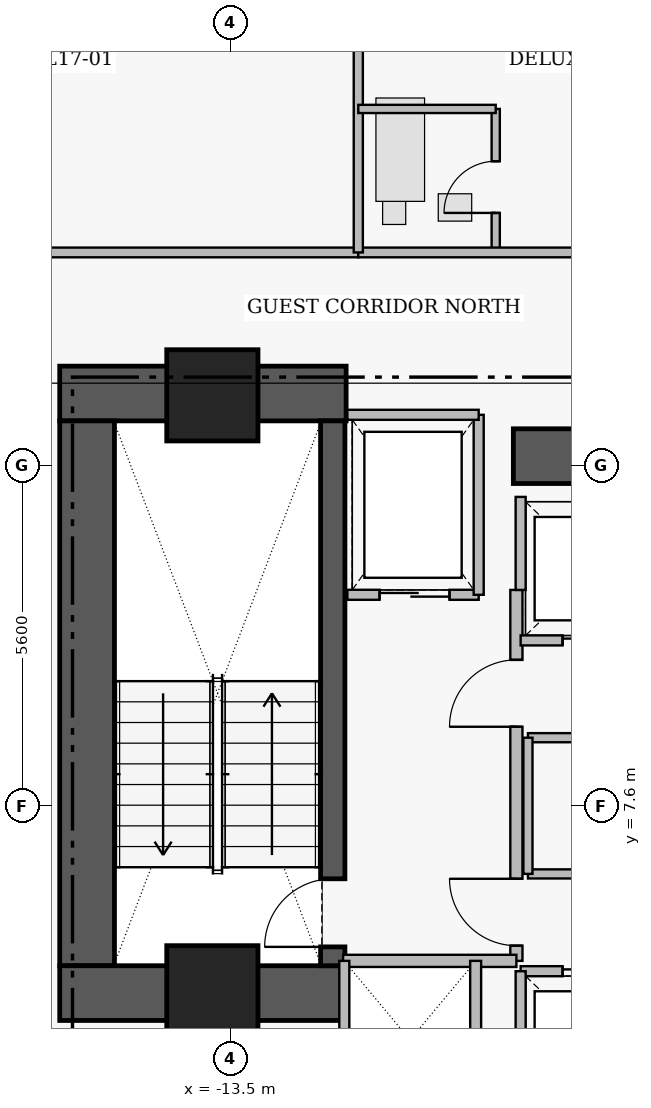
"""IFC4 building model, lengths in metres.
Left out: names, types, materials, properties, quantities, classifications, styles, units other than length and angle.
Written with IfcOpenShell. Run it as: python <this file> out.ifc"""

import sys

from ifc_helpers import new_model, si_unit, direction, frame, frame_2d, origin, origin_2d, place, context, subcontext, project, spatial, rectangle, extrude, element, fill, save


model = new_model("IFC4")
c1 = context("Model", 3, precision=1e-05, world=origin(), true_north=direction((0.0, 1.0)))
c2 = subcontext(c1, "Body", "Model", "MODEL_VIEW")
j1 = project(units=[si_unit("LENGTHUNIT", "METRE"), si_unit("PLANEANGLEUNIT", "RADIAN")], contexts=[c1])
p1 = place(None, origin())
s1 = spatial("IfcSite", under=j1, at=p1, CompositionType="ELEMENT")
p2 = place(p1, origin())
s2 = spatial("IfcBuilding", under=s1, at=p2, CompositionType="ELEMENT")
p3 = place(p2, frame((0.0, 0.0, 71.4)))
s3 = spatial("IfcBuildingStorey", under=s2, at=p3, CompositionType="ELEMENT", Elevation=71.4)
p4 = place(p3, frame((-16.31, 14.38, 0.0), z_axis=(0.0, 0.0, 1.0), x_axis=(1.0, 0.0, 0.0)))
e1 = element("IfcWall", 1, at=p4, inside=s3, PredefinedType="SHEAR", context=c2, shape_type="SweptSolid", body=[
    extrude(rectangle(XDim=4.71, YDim=0.9, at=frame_2d((2.355, 0.0))), origin(), (0.0, 0.0, 1.0), 3.46),
])
p5 = place(p3, frame((-15.86, 4.97, 0.0), z_axis=(0.0, 0.0, 1.0), x_axis=(0.0, 1.0, 0.0)))
e2 = element("IfcWall", 2, at=p5, inside=s3, PredefinedType="SHEAR", context=c2, shape_type="SweptSolid", body=[
    extrude(rectangle(XDim=8.96, YDim=0.9, at=frame_2d((4.48, 0.0))), origin(), (0.0, 0.0, 1.0), 3.46),
])
p6 = place(p3, frame((-16.31, 4.52, 0.0), z_axis=(0.0, 0.0, 1.0), x_axis=(1.0, 0.0, 0.0)))
e3 = element("IfcWall", 3, at=p6, inside=s3, PredefinedType="SHEAR", context=c2, shape_type="SweptSolid", body=[
    extrude(rectangle(XDim=4.71, YDim=0.9, at=frame_2d((2.355, 0.0))), origin(), (0.0, 0.0, 1.0), 3.46),
])
p7 = place(p3, frame((-8.85, 13.35, 0.0), z_axis=(0.0, 0.0, 1.0), x_axis=(1.0, 0.0, 0.0)))
e4 = element("IfcWall", 4, at=p7, inside=s3, PredefinedType="SHEAR", context=c2, shape_type="SweptSolid", body=[
    extrude(rectangle(XDim=7.6, YDim=0.9, at=frame_2d((3.8, 0.0))), origin(), (0.0, 0.0, 1.0), 3.43),
])
p8 = place(p3, frame((-11.82, 4.97, 0.0), z_axis=(0.0, 0.0, 1.0), x_axis=(0.0, 1.0, 0.0)))
e5 = element("IfcWall", 5, at=p8, inside=s3, PredefinedType="SHEAR", context=c2, shape_type="SweptSolid", body=[
    extrude(rectangle(XDim=8.96, YDim=0.4, at=frame_2d((4.48, 0.0))), origin(), (0.0, 0.0, 1.0), 3.46),
])
p9 = place(p8, frame((0.31, 0.0, 0.0)))
e6 = element("IfcOpeningElement", 6, at=p9, cuts=e5, PredefinedType="OPENING", context=c2, shape_type="SweptSolid", body=[
    extrude(rectangle(XDim=1.12, YDim=2.22, at=frame_2d((0.56, 1.11))), frame((0.0, 0.21, 0.0), z_axis=(0.0, -1.0, 0.0), x_axis=(1.0, 0.0, 0.0)), (0.0, 0.0, 1.0), 0.42),
])
for number, where, z_axis, x_axis in (
    (7, (-13.8, 14.35, 0.0), (0.0, 0.0, 1.0), (1.0, 0.0, 0.0)),
    (8, (-13.8, 4.55, 0.0), (0.0, 0.0, 1.0), (1.0, 0.0, 0.0)),
):
    element("IfcColumn", number, at=place(p3, frame(where, z_axis=z_axis, x_axis=x_axis)), inside=s3, PredefinedType="COLUMN", context=c2, shape_type="SweptSolid", body=[
        extrude(rectangle(XDim=1.5, YDim=1.5, at=origin_2d()), origin(), (0.0, 0.0, 1.0), 3.65),
    ])
p10 = place(p3, frame((-8.8, 5.05, 0.0), z_axis=(0.0, 0.0, 1.0), x_axis=(0.0, 1.0, 0.0)))
e9 = element("IfcWall", 9, at=p10, inside=s3, PredefinedType="PARTITIONING", context=c2, shape_type="SweptSolid", body=[
    extrude(rectangle(XDim=6.1, YDim=0.2, at=frame_2d((3.05, 0.0))), origin(), (0.0, 0.0, 1.0), 3.43),
])
p11 = place(p10, frame((0.25, 0.0, 0.0)))
e10 = element("IfcOpeningElement", 10, at=p11, cuts=e9, PredefinedType="OPENING", context=c2, shape_type="SweptSolid", body=[
    extrude(rectangle(XDim=1.1, YDim=2.2, at=frame_2d((0.55, 1.1))), frame((0.0, 0.11, 0.0), z_axis=(0.0, -1.0, 0.0), x_axis=(1.0, 0.0, 0.0)), (0.0, 0.0, 1.0), 0.22),
])
p12 = place(p10, frame((3.85, 0.0, 0.0)))
e11 = element("IfcOpeningElement", 11, at=p12, cuts=e9, PredefinedType="OPENING", context=c2, shape_type="SweptSolid", body=[
    extrude(rectangle(XDim=1.1, YDim=2.2, at=frame_2d((0.55, 1.1))), frame((0.0, 0.11, 0.0), z_axis=(0.0, -1.0, 0.0), x_axis=(1.0, 0.0, 0.0)), (0.0, 0.0, 1.0), 0.22),
])
p13 = place(p3, frame((-11.58, 11.07, 0.0), z_axis=(0.0, 0.0, 1.0), x_axis=(1.0, 0.0, 0.0)))
e12 = element("IfcWall", 12, at=p13, inside=s3, PredefinedType="PARTITIONING", context=c2, shape_type="SweptSolid", body=[
    extrude(rectangle(XDim=2.16, YDim=0.165, at=frame_2d((1.08, 0.0))), origin(), (0.0, 0.0, 1.0), 3.43),
])
p14 = place(p13, frame((0.53, 0.0, 0.0)))
e13 = element("IfcOpeningElement", 13, at=p14, cuts=e12, PredefinedType="OPENING", context=c2, shape_type="SweptSolid", body=[
    extrude(rectangle(XDim=1.15, YDim=2.25, at=frame_2d((0.575, 1.125))), frame((0.0, 0.093, 0.0), z_axis=(0.0, -1.0, 0.0), x_axis=(1.0, 0.0, 0.0)), (0.0, 0.0, 1.0), 0.185),
])
p15 = place(p3, frame((-8.73, 4.88, 0.0), z_axis=(0.0, 0.0, 1.0), x_axis=(1.0, 0.0, 0.0)))
e14 = element("IfcWall", 14, at=p15, inside=s3, PredefinedType="PARTITIONING", context=c2, shape_type="SweptSolid", body=[
    extrude(rectangle(XDim=2.48, YDim=0.165, at=frame_2d((1.24, 0.0))), origin(), (0.0, 0.0, 1.0), 3.43),
])
p16 = place(p15, frame((0.69, 0.0, 0.0)))
e15 = element("IfcOpeningElement", 15, at=p16, cuts=e14, PredefinedType="OPENING", context=c2, shape_type="SweptSolid", body=[
    extrude(rectangle(XDim=1.1, YDim=2.25, at=frame_2d((0.55, 1.125))), frame((0.0, 0.093, 0.0), z_axis=(0.0, -1.0, 0.0), x_axis=(1.0, 0.0, 0.0)), (0.0, 0.0, 1.0), 0.185),
])
p17 = place(p3, frame((-8.73, 10.32, 0.0), z_axis=(0.0, 0.0, 1.0), x_axis=(1.0, 0.0, 0.0)))
e16 = element("IfcWall", 16, at=p17, inside=s3, PredefinedType="PARTITIONING", context=c2, shape_type="SweptSolid", body=[
    extrude(rectangle(XDim=2.48, YDim=0.165, at=frame_2d((1.24, 0.0))), origin(), (0.0, 0.0, 1.0), 3.43),
])
p18 = place(p17, frame((0.69, 0.0, 0.0)))
e17 = element("IfcOpeningElement", 17, at=p18, cuts=e16, PredefinedType="OPENING", context=c2, shape_type="SweptSolid", body=[
    extrude(rectangle(XDim=1.1, YDim=2.25, at=frame_2d((0.55, 1.125))), frame((0.0, 0.093, 0.0), z_axis=(0.0, -1.0, 0.0), x_axis=(1.0, 0.0, 0.0)), (0.0, 0.0, 1.0), 0.185),
])
p19 = place(p3, frame((-8.61, 8.72, 0.0), z_axis=(0.0, 0.0, 1.0), x_axis=(1.0, 0.0, 0.0)))
e18 = element("IfcWall", 18, at=p19, inside=s3, PredefinedType="PARTITIONING", context=c2, shape_type="SweptSolid", body=[
    extrude(rectangle(XDim=2.92, YDim=0.15, at=frame_2d((1.46, 0.0))), origin(), (0.0, 0.0, 1.0), 3.43),
])
p20 = place(p19, frame((1.01, 0.0, 0.0)))
e19 = element("IfcOpeningElement", 19, at=p20, cuts=e18, PredefinedType="OPENING", context=c2, shape_type="SweptSolid", body=[
    extrude(rectangle(XDim=0.9, YDim=2.15, at=frame_2d((0.45, 1.075))), frame((0.0, 0.085, 0.0), z_axis=(0.0, -1.0, 0.0), x_axis=(1.0, 0.0, 0.0)), (0.0, 0.0, 1.0), 0.17),
])
p21 = place(p3, frame((-25.64, 16.7, 0.0), z_axis=(0.0, 0.0, 1.0), x_axis=(1.0, 0.0, 0.0)))
e20 = element("IfcWall", 20, at=p21, inside=s3, PredefinedType="PARTITIONING", context=c2, shape_type="SweptSolid", body=[
    extrude(rectangle(XDim=14.24, YDim=0.16, at=frame_2d((7.12, 0.0))), origin(), (0.0, 0.0, 1.0), 2.973),
])
p22 = place(p21, frame((7.77, 0.0, 0.0)))
e21 = element("IfcOpeningElement", 21, at=p22, cuts=e20, PredefinedType="OPENING", context=c2, shape_type="SweptSolid", body=[
    extrude(rectangle(XDim=1.0, YDim=2.15, at=frame_2d((0.5, 1.075))), frame((0.0, 0.09, 0.0), z_axis=(0.0, -1.0, 0.0), x_axis=(1.0, 0.0, 0.0)), (0.0, 0.0, 1.0), 0.18),
])
p23 = place(p3, frame((-9.14, 16.7, 0.0), z_axis=(0.0, 0.0, 1.0), x_axis=(0.0, 1.0, 0.0)))
e22 = element("IfcWall", 22, at=p23, inside=s3, PredefinedType="PLUMBINGWALL", context=c2, shape_type="SweptSolid", body=[
    extrude(rectangle(XDim=2.36, YDim=0.135, at=frame_2d((1.18, 0.0))), origin(), (0.0, 0.0, 1.0), 3.43),
])
p24 = place(p23, frame((0.65, 0.0, 0.0)))
e23 = element("IfcOpeningElement", 23, at=p24, cuts=e22, PredefinedType="OPENING", context=c2, shape_type="SweptSolid", body=[
    extrude(rectangle(XDim=0.85, YDim=2.1, at=frame_2d((0.425, 1.05))), frame((0.0, 0.077, 0.0), z_axis=(0.0, -1.0, 0.0), x_axis=(1.0, 0.0, 0.0)), (0.0, 0.0, 1.0), 0.155),
])
p25 = place(p3, frame((-11.4, 16.7, 0.0), z_axis=(0.0, 0.0, 1.0), x_axis=(1.0, 0.0, 0.0)))
e24 = element("IfcWall", 24, at=p25, inside=s3, PredefinedType="PARTITIONING", context=c2, shape_type="SweptSolid", body=[
    extrude(rectangle(XDim=11.32, YDim=0.16, at=frame_2d((5.66, 0.0))), origin(), (0.0, 0.0, 1.0), 2.973),
])
p26 = place(p25, frame((6.31, 0.0, 0.0)))
e25 = element("IfcOpeningElement", 25, at=p26, cuts=e24, PredefinedType="OPENING", context=c2, shape_type="SweptSolid", body=[
    extrude(rectangle(XDim=1.0, YDim=2.15, at=frame_2d((0.5, 1.075))), frame((0.0, 0.09, 0.0), z_axis=(0.0, -1.0, 0.0), x_axis=(1.0, 0.0, 0.0)), (0.0, 0.0, 1.0), 0.18),
])
p27 = place(p3, frame((-11.65, 5.05, 0.0), z_axis=(0.0, 0.0, 1.0), x_axis=(1.0, 0.0, 0.0)))
e26 = element("IfcWall", 26, at=p27, inside=s3, PredefinedType="PARTITIONING", context=c2, shape_type="SweptSolid", body=[
    extrude(rectangle(XDim=2.85, YDim=0.2, at=frame_2d((1.425, 0.0))), origin(), (0.0, 0.0, 1.0), 3.43),
])
p28 = place(p3, frame((-9.42, 11.07, 0.0), z_axis=(0.0, 0.0, 1.0), x_axis=(0.0, 1.0, 0.0)))
e27 = element("IfcWall", 27, at=p28, inside=s3, PredefinedType="PARTITIONING", context=c2, shape_type="SweptSolid", body=[
    extrude(rectangle(XDim=2.96, YDim=0.165, at=frame_2d((1.48, 0.0))), origin(), (0.0, 0.0, 1.0), 3.43),
])
p29 = place(p3, frame((-11.58, 14.03, 0.0), z_axis=(0.0, 0.0, 1.0), x_axis=(1.0, 0.0, 0.0)))
e28 = element("IfcWall", 28, at=p29, inside=s3, PredefinedType="PARTITIONING", context=c2, shape_type="SweptSolid", body=[
    extrude(rectangle(XDim=2.16, YDim=0.165, at=frame_2d((1.08, 0.0))), origin(), (0.0, 0.0, 1.0), 3.43),
])
p30 = place(p3, frame((-8.73, 2.52, 0.0), z_axis=(0.0, 0.0, 1.0), x_axis=(0.0, 1.0, 0.0)))
e29 = element("IfcWall", 29, at=p30, inside=s3, PredefinedType="PARTITIONING", context=c2, shape_type="SweptSolid", body=[
    extrude(rectangle(XDim=2.36, YDim=0.165, at=frame_2d((1.18, 0.0))), origin(), (0.0, 0.0, 1.0), 3.43),
])
p31 = place(p3, frame((-8.73, 11.15, 0.0), z_axis=(0.0, 0.0, 1.0), x_axis=(0.0, 1.0, 0.0)))
e30 = element("IfcWall", 30, at=p31, inside=s3, PredefinedType="PARTITIONING", context=c2, shape_type="SweptSolid", body=[
    extrude(rectangle(XDim=1.53, YDim=0.165, at=frame_2d((0.765, 0.0))), origin(), (0.0, 0.0, 1.0), 3.43),
])
p32 = place(p3, frame((-9.47, 2.45, 0.0), z_axis=(0.0, 0.0, 1.0), x_axis=(0.0, 1.0, 0.0)))
e31 = element("IfcWall", 31, at=p32, inside=s3, PredefinedType="PARTITIONING", context=c2, shape_type="SweptSolid", body=[
    extrude(rectangle(XDim=2.6, YDim=0.18, at=frame_2d((1.3, 0.0))), origin(), (0.0, 0.0, 1.0), 3.43),
])
p33 = place(p3, frame((-11.63, 2.47, 0.0), z_axis=(0.0, 0.0, 1.0), x_axis=(0.0, 1.0, 0.0)))
e32 = element("IfcWall", 32, at=p33, inside=s3, PredefinedType="PARTITIONING", context=c2, shape_type="SweptSolid", body=[
    extrude(rectangle(XDim=2.58, YDim=0.165, at=frame_2d((1.29, 0.0))), origin(), (0.0, 0.0, 1.0), 3.43),
])
p34 = place(p3, frame((-8.61, 6.48, 0.0), z_axis=(0.0, 0.0, 1.0), x_axis=(1.0, 0.0, 0.0)))
e33 = element("IfcWall", 33, at=p34, inside=s3, PredefinedType="PARTITIONING", context=c2, shape_type="SweptSolid", body=[
    extrude(rectangle(XDim=2.92, YDim=0.15, at=frame_2d((1.46, 0.0))), origin(), (0.0, 0.0, 1.0), 3.43),
])
p35 = place(p3, frame((-8.61, 6.48, 0.0), z_axis=(0.0, 0.0, 1.0), x_axis=(0.0, 1.0, 0.0)))
e34 = element("IfcWall", 34, at=p35, inside=s3, PredefinedType="PARTITIONING", context=c2, shape_type="SweptSolid", body=[
    extrude(rectangle(XDim=2.24, YDim=0.15, at=frame_2d((1.12, 0.0))), origin(), (0.0, 0.0, 1.0), 3.43),
])
p36 = place(p3, frame((-11.4, 16.7, 0.0), z_axis=(0.0, 0.0, 1.0), x_axis=(0.0, 1.0, 0.0)))
e35 = element("IfcWall", 35, at=p36, inside=s3, PredefinedType="PARTITIONING", context=c2, shape_type="SweptSolid", body=[
    extrude(rectangle(XDim=6.32, YDim=0.15, at=frame_2d((3.16, 0.0))), origin(), (0.0, 0.0, 1.0), 3.43),
])
p37 = place(p3, frame((-11.4, 19.06, 0.0), z_axis=(0.0, 0.0, 1.0), x_axis=(1.0, 0.0, 0.0)))
e36 = element("IfcWall", 36, at=p37, inside=s3, PredefinedType="PLUMBINGWALL", context=c2, shape_type="SweptSolid", body=[
    extrude(rectangle(XDim=2.26, YDim=0.135, at=frame_2d((1.13, 0.0))), origin(), (0.0, 0.0, 1.0), 2.973),
])
p38 = place(p9, origin())
e37 = element("IfcDoor", 37, at=p38, inside=s3, OperationType="SINGLE_SWING_LEFT", PredefinedType="DOOR", context=c2, shape_type="SweptSolid", body=[
    extrude(rectangle(XDim=1.12, YDim=2.22, at=frame_2d((0.56, 1.11))), frame((0.0, 0.025, 0.0), z_axis=(0.0, -1.0, 0.0), x_axis=(1.0, 0.0, 0.0)), (0.0, 0.0, 1.0), 0.05),
])
fill(e6, e37)
p39 = place(p11, origin())
e38 = element("IfcDoor", 38, at=p39, inside=s3, OperationType="SINGLE_SWING_RIGHT", PredefinedType="DOOR", context=c2, shape_type="SweptSolid", body=[
    extrude(rectangle(XDim=1.1, YDim=2.2, at=frame_2d((0.55, 1.1))), frame((0.0, 0.025, 0.0), z_axis=(0.0, -1.0, 0.0), x_axis=(1.0, 0.0, 0.0)), (0.0, 0.0, 1.0), 0.05),
])
fill(e10, e38)
p40 = place(p12, origin())
e39 = element("IfcDoor", 39, at=p40, inside=s3, OperationType="SINGLE_SWING_LEFT", PredefinedType="DOOR", context=c2, shape_type="SweptSolid", body=[
    extrude(rectangle(XDim=1.1, YDim=2.2, at=frame_2d((0.55, 1.1))), frame((0.0, 0.025, 0.0), z_axis=(0.0, -1.0, 0.0), x_axis=(1.0, 0.0, 0.0)), (0.0, 0.0, 1.0), 0.05),
])
fill(e11, e39)
p41 = place(p14, origin())
e40 = element("IfcDoor", 40, at=p41, inside=s3, OperationType="SLIDING_TO_LEFT", PredefinedType="DOOR", context=c2, shape_type="SweptSolid", body=[
    extrude(rectangle(XDim=1.15, YDim=2.25, at=frame_2d((0.575, 1.125))), frame((0.0, 0.025, 0.0), z_axis=(0.0, -1.0, 0.0), x_axis=(1.0, 0.0, 0.0)), (0.0, 0.0, 1.0), 0.05),
])
fill(e13, e40)
p42 = place(p16, origin())
e41 = element("IfcDoor", 41, at=p42, inside=s3, OperationType="SLIDING_TO_LEFT", PredefinedType="DOOR", context=c2, shape_type="SweptSolid", body=[
    extrude(rectangle(XDim=1.1, YDim=2.25, at=frame_2d((0.55, 1.125))), frame((0.0, 0.025, 0.0), z_axis=(0.0, -1.0, 0.0), x_axis=(1.0, 0.0, 0.0)), (0.0, 0.0, 1.0), 0.05),
])
fill(e15, e41)
p43 = place(p18, origin())
e42 = element("IfcDoor", 42, at=p43, inside=s3, OperationType="SLIDING_TO_LEFT", PredefinedType="DOOR", context=c2, shape_type="SweptSolid", body=[
    extrude(rectangle(XDim=1.1, YDim=2.25, at=frame_2d((0.55, 1.125))), frame((0.0, 0.025, 0.0), z_axis=(0.0, -1.0, 0.0), x_axis=(1.0, 0.0, 0.0)), (0.0, 0.0, 1.0), 0.05),
])
fill(e17, e42)
p44 = place(p24, origin())
e43 = element("IfcDoor", 43, at=p44, inside=s3, OperationType="SINGLE_SWING_LEFT", PredefinedType="DOOR", context=c2, shape_type="SweptSolid", body=[
    extrude(rectangle(XDim=0.85, YDim=2.1, at=frame_2d((0.425, 1.05))), frame((0.0, 0.025, 0.0), z_axis=(0.0, -1.0, 0.0), x_axis=(1.0, 0.0, 0.0)), (0.0, 0.0, 1.0), 0.05),
])
fill(e23, e43)
save(model, sys.argv[1])
